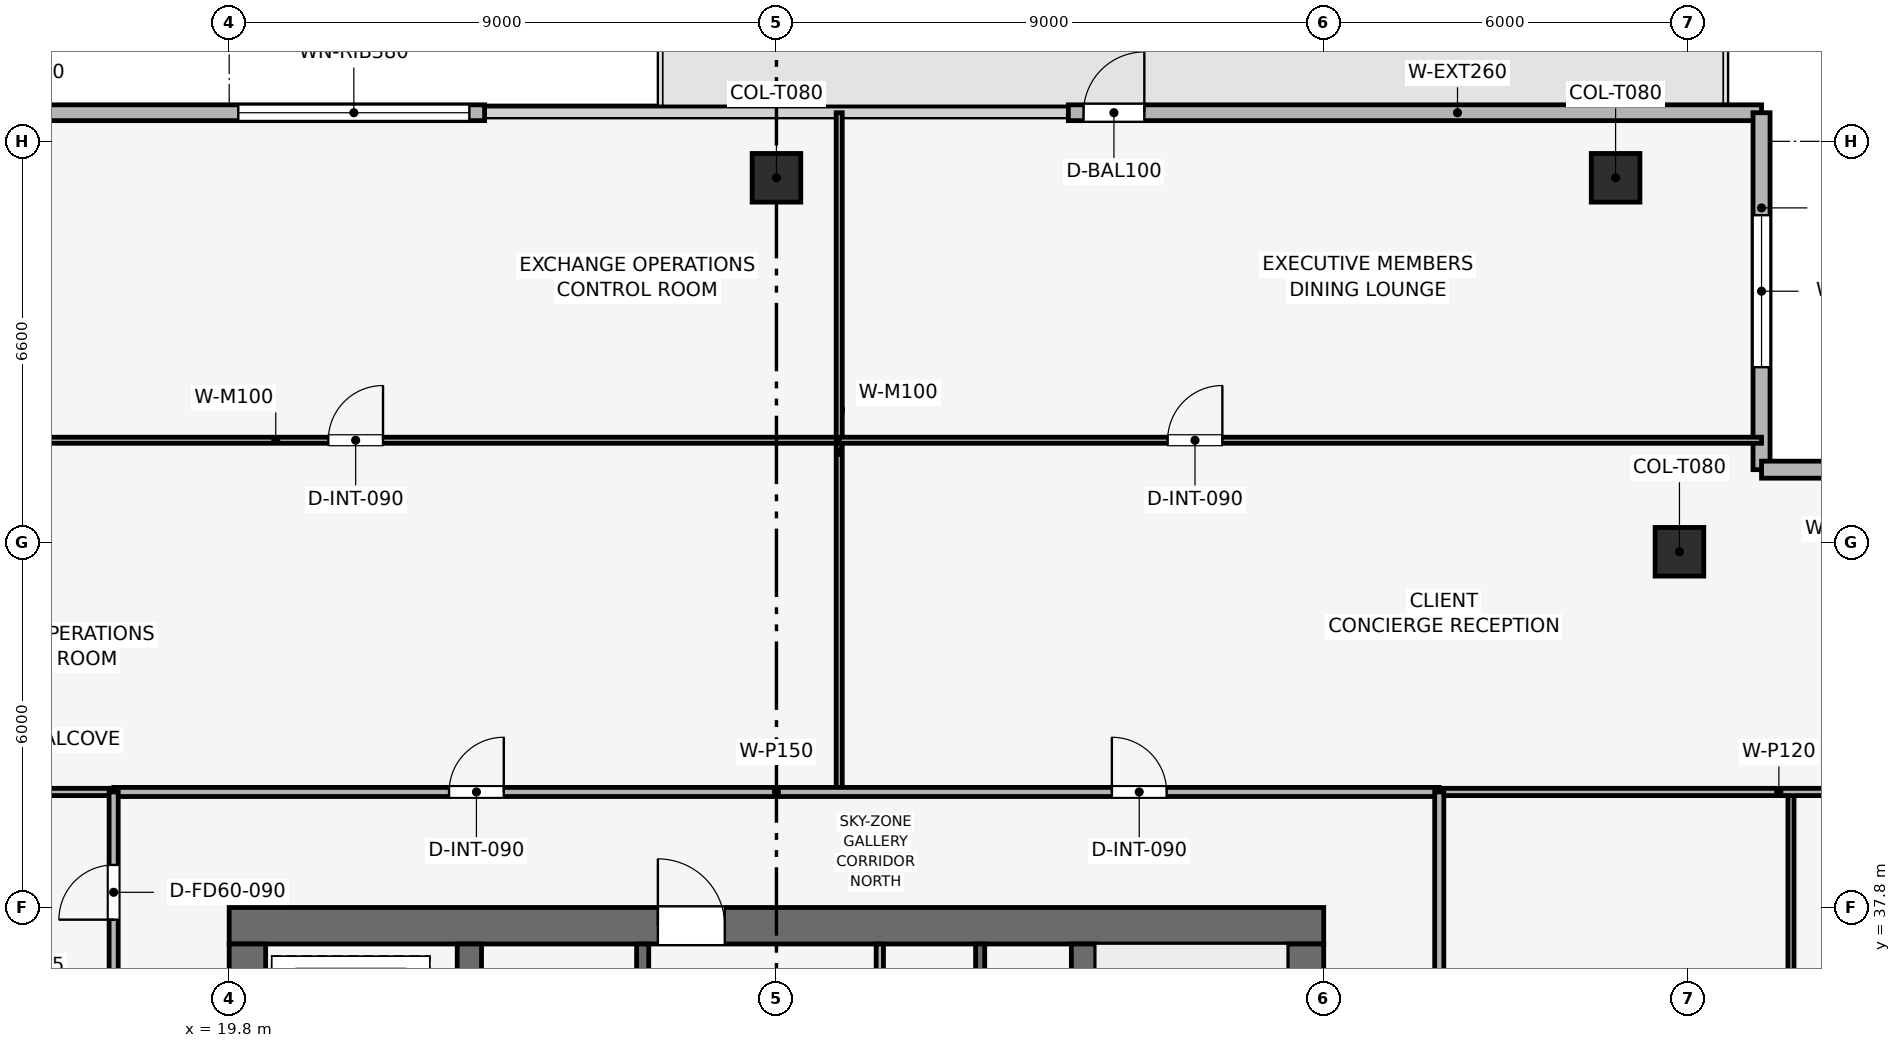
"""IFC4 building model, lengths in metres.
Left out: names, types, materials, properties, quantities, classifications, styles, units other than length and angle.
Written with IfcOpenShell. Run it as: python <this file> out.ifc"""

import sys

from ifc_helpers import new_model, si_unit, direction, frame, frame_2d, origin, origin_2d, place, context, subcontext, project, spatial, rectangle, extrude, element, fill, save


model = new_model("IFC4")
c1 = context("Model", 3, precision=1e-05, world=origin(), true_north=direction((0.0, 1.0)))
c2 = subcontext(c1, "Body", "Model", "MODEL_VIEW")
j1 = project(units=[si_unit("LENGTHUNIT", "METRE"), si_unit("PLANEANGLEUNIT", "RADIAN")], contexts=[c1])
p1 = place(None, origin())
s1 = spatial("IfcSite", under=j1, at=p1, CompositionType="ELEMENT")
p2 = place(p1, origin())
s2 = spatial("IfcBuilding", under=s1, at=p2, CompositionType="ELEMENT")
p3 = place(p2, frame((0.0, 0.0, 336.75)))
s3 = spatial("IfcBuildingStorey", under=s2, at=p3, CompositionType="ELEMENT", Elevation=336.75)
p4 = place(p3, frame((19.8, 37.5, 0.0), z_axis=(0.0, 0.0, 1.0), x_axis=(1.0, 0.0, 0.0)))
e1 = element("IfcWall", 1, at=p4, inside=s3, PredefinedType="SHEAR", context=c2, shape_type="SweptSolid", body=[
    extrude(rectangle(XDim=18.0, YDim=0.6, at=frame_2d((9.0, 0.0))), origin(), (0.0, 0.0, 1.0), 3.75),
])
p5 = place(p4, frame((7.05, 0.0, 0.0)))
e2 = element("IfcOpeningElement", 2, at=p5, cuts=e1, PredefinedType="OPENING", context=c2, shape_type="SweptSolid", body=[
    extrude(rectangle(XDim=1.1, YDim=2.15, at=frame_2d((0.55, 1.075))), frame((0.0, 0.31, 0.0), z_axis=(0.0, -1.0, 0.0), x_axis=(1.0, 0.0, 0.0)), (0.0, 0.0, 1.0), 0.62),
])
p6 = place(p3, frame((20.1, 20.4, 0.0), z_axis=(0.0, 0.0, 1.0), x_axis=(0.0, 1.0, 0.0)))
e3 = element("IfcWall", 3, at=p6, inside=s3, PredefinedType="SHEAR", context=c2, shape_type="SweptSolid", body=[
    extrude(rectangle(XDim=16.8, YDim=0.6, at=frame_2d((8.4, 0.0))), origin(), (0.0, 0.0, 1.0), 3.75),
])
p7 = place(p6, frame((10.4, 0.0, 0.0)))
e4 = element("IfcOpeningElement", 4, at=p7, cuts=e3, PredefinedType="OPENING", context=c2, shape_type="SweptSolid", body=[
    extrude(rectangle(XDim=1.1, YDim=2.15, at=frame_2d((0.55, 1.075))), frame((0.0, 0.31, 0.0), z_axis=(0.0, -1.0, 0.0), x_axis=(1.0, 0.0, 0.0)), (0.0, 0.0, 1.0), 0.62),
])
p8 = place(p3, frame((37.5, 20.4, 0.0), z_axis=(0.0, 0.0, 1.0), x_axis=(0.0, 1.0, 0.0)))
e5 = element("IfcWall", 5, at=p8, inside=s3, PredefinedType="SHEAR", context=c2, shape_type="SweptSolid", body=[
    extrude(rectangle(XDim=16.8, YDim=0.6, at=frame_2d((8.4, 0.0))), origin(), (0.0, 0.0, 1.0), 3.75),
])
p9 = place(p8, frame((4.9, 0.0, 0.0)))
e6 = element("IfcOpeningElement", 6, at=p9, cuts=e5, PredefinedType="OPENING", context=c2, shape_type="SweptSolid", body=[
    extrude(rectangle(XDim=1.1, YDim=2.15, at=frame_2d((0.55, 1.075))), frame((0.0, 0.31, 0.0), z_axis=(0.0, -1.0, 0.0), x_axis=(1.0, 0.0, 0.0)), (0.0, 0.0, 1.0), 0.62),
])
for number, where, z_axis, x_axis in (
    (7, (23.75, 20.4, 0.0), (0.0, 0.0, 1.0), (0.0, 1.0, 0.0)),
    (8, (33.85, 20.4, 0.0), (0.0, 0.0, 1.0), (0.0, 1.0, 0.0)),
):
    element("IfcWall", number, at=place(p3, frame(where, z_axis=z_axis, x_axis=x_axis)), inside=s3, PredefinedType="SHEAR", context=c2, shape_type="SweptSolid", body=[
        extrude(rectangle(XDim=16.8, YDim=0.4, at=frame_2d((8.4, 0.0))), origin(), (0.0, 0.0, 1.0), 3.75),
    ])
for number, where, z_axis, x_axis in (
    (9, (42.6, 49.8, 0.003), (0.0, 0.0, 1.0), (1.0, 0.0, 0.0)),
    (10, (28.8, 49.8, 0.003), (0.0, 0.0, 1.0), (1.0, 0.0, 0.0)),
    (11, (43.65, 43.65, 0.003), (0.0, 0.0, 1.0), (1.0, 0.0, 0.0)),
):
    element("IfcColumn", number, at=place(p3, frame(where, z_axis=z_axis, x_axis=x_axis)), inside=s3, PredefinedType="COLUMN", context=c2, shape_type="SweptSolid", body=[
        extrude(rectangle(XDim=0.8, YDim=0.8, at=origin_2d()), origin(), (0.0, 0.0, 1.0), 3.504),
    ])
p10 = place(p3, frame((12.6, 50.87, 0.0), z_axis=(0.0, 0.0, 1.0), x_axis=(1.0, 0.0, 0.0)))
e12 = element("IfcWall", 12, at=p10, inside=s3, PredefinedType="SOLIDWALL", context=c2, shape_type="SweptSolid", body=[
    extrude(rectangle(XDim=11.4, YDim=0.26, at=frame_2d((5.7, 0.0))), origin(), (0.0, 0.0, 1.0), 3.51),
])
p11 = place(p10, frame((7.35, 0.0, 0.9)))
e13 = element("IfcOpeningElement", 13, at=p11, cuts=e12, PredefinedType="OPENING", context=c2, shape_type="SweptSolid", body=[
    extrude(rectangle(XDim=3.8, YDim=1.9, at=frame_2d((1.9, 0.95))), frame((0.0, 0.14, 0.0), z_axis=(0.0, -1.0, 0.0), x_axis=(1.0, 0.0, 0.0)), (0.0, 0.0, 1.0), 0.28),
])
p12 = place(p3, frame((33.6, 50.87, 0.0), z_axis=(0.0, 0.0, 1.0), x_axis=(1.0, 0.0, 0.0)))
e14 = element("IfcWall", 14, at=p12, inside=s3, PredefinedType="SOLIDWALL", context=c2, shape_type="SweptSolid", body=[
    extrude(rectangle(XDim=11.4, YDim=0.26, at=frame_2d((5.7, 0.0))), origin(), (0.0, 0.0, 1.0), 3.51),
])
p13 = place(p12, frame((0.25, 0.0, 0.0)))
e15 = element("IfcOpeningElement", 15, at=p13, cuts=e14, PredefinedType="OPENING", context=c2, shape_type="SweptSolid", body=[
    extrude(rectangle(XDim=1.0, YDim=2.2, at=frame_2d((0.5, 1.1))), frame((0.0, 0.14, 0.0), z_axis=(0.0, -1.0, 0.0), x_axis=(1.0, 0.0, 0.0)), (0.0, 0.0, 1.0), 0.28),
])
p14 = place(p3, frame((45.0, 50.87, 0.0), z_axis=(0.0, 0.0, 1.0), x_axis=(0.0, -1.0, 0.0)))
e16 = element("IfcWall", 16, at=p14, inside=s3, PredefinedType="SOLIDWALL", context=c2, shape_type="SweptSolid", body=[
    extrude(rectangle(XDim=5.87, YDim=0.28, at=frame_2d((2.935, 0.0))), origin(), (0.0, 0.0, 1.0), 3.51),
])
p15 = place(p14, frame((1.685, 0.0, 0.9)))
e17 = element("IfcOpeningElement", 17, at=p15, cuts=e16, PredefinedType="OPENING", context=c2, shape_type="SweptSolid", body=[
    extrude(rectangle(XDim=2.5, YDim=1.9, at=frame_2d((1.25, 0.95))), frame((0.0, 0.15, 0.0), z_axis=(0.0, -1.0, 0.0), x_axis=(1.0, 0.0, 0.0)), (0.0, 0.0, 1.0), 0.3),
])
p16 = place(p3, frame((45.0, 45.0, 0.0), z_axis=(0.0, 0.0, 1.0), x_axis=(1.0, 0.0, 0.0)))
e18 = element("IfcWall", 18, at=p16, inside=s3, PredefinedType="SOLIDWALL", context=c2, shape_type="SweptSolid", body=[
    extrude(rectangle(XDim=5.87, YDim=0.28, at=frame_2d((2.935, 0.0))), origin(), (0.0, 0.0, 1.0), 3.51),
])
p17 = place(p16, frame((1.685, 0.0, 0.9)))
e19 = element("IfcOpeningElement", 19, at=p17, cuts=e18, PredefinedType="OPENING", context=c2, shape_type="SweptSolid", body=[
    extrude(rectangle(XDim=2.5, YDim=1.9, at=frame_2d((1.25, 0.95))), frame((0.0, 0.15, 0.0), z_axis=(0.0, -1.0, 0.0), x_axis=(1.0, 0.0, 0.0)), (0.0, 0.0, 1.0), 0.3),
])
p18 = place(p3, frame((32.15, 34.0, 0.0), z_axis=(0.0, 0.0, 1.0), x_axis=(0.0, 1.0, 0.0)))
e20 = element("IfcWall", 20, at=p18, inside=s3, PredefinedType="SHEAR", context=c2, shape_type="SweptSolid", body=[
    extrude(rectangle(XDim=3.2, YDim=0.15, at=frame_2d((1.6, 0.0))), origin(), (0.0, 0.0, 1.0), 3.51),
])
p19 = place(p3, frame((26.6, 34.0, 0.0), z_axis=(0.0, 0.0, 1.0), x_axis=(0.0, 1.0, 0.0)))
e21 = element("IfcWall", 21, at=p19, inside=s3, PredefinedType="SHEAR", context=c2, shape_type="SweptSolid", body=[
    extrude(rectangle(XDim=3.2, YDim=0.2, at=frame_2d((1.6, 0.0))), origin(), (0.0, 0.0, 1.0), 3.51),
])
p20 = place(p19, frame((0.75, 0.0, 0.0)))
e22 = element("IfcOpeningElement", 22, at=p20, cuts=e21, PredefinedType="OPENING", context=c2, shape_type="SweptSolid", body=[
    extrude(rectangle(XDim=1.1, YDim=2.15, at=frame_2d((0.55, 1.075))), frame((0.0, 0.11, 0.0), z_axis=(0.0, -1.0, 0.0), x_axis=(1.0, 0.0, 0.0)), (0.0, 0.0, 1.0), 0.22),
])
p21 = place(p3, frame((30.5, 33.925, 0.0), z_axis=(0.0, 0.0, 1.0), x_axis=(0.0, 1.0, 0.0)))
e23 = element("IfcWall", 23, at=p21, inside=s3, PredefinedType="PARTITIONING", context=c2, shape_type="SweptSolid", body=[
    extrude(rectangle(XDim=3.275, YDim=0.12, at=frame_2d((1.637, 0.0))), origin(), (0.0, 0.0, 1.0), 3.51),
])
p22 = place(p21, frame((0.85, 0.0, 0.0)))
e24 = element("IfcOpeningElement", 24, at=p22, cuts=e23, PredefinedType="OPENING", context=c2, shape_type="SweptSolid", body=[
    extrude(rectangle(XDim=0.9, YDim=2.1, at=frame_2d((0.45, 1.05))), frame((0.0, 0.07, 0.0), z_axis=(0.0, -1.0, 0.0), x_axis=(1.0, 0.0, 0.0)), (0.0, 0.0, 1.0), 0.14),
])
p23 = place(p3, frame((12.6, 45.484, 0.0), z_axis=(0.0, 0.0, 1.0), x_axis=(1.0, 0.0, 0.0)))
e25 = element("IfcWall", 25, at=p23, inside=s3, PredefinedType="MOVABLE", context=c2, shape_type="SweptSolid", body=[
    extrude(rectangle(XDim=17.232, YDim=0.1, at=frame_2d((8.616, 0.0))), origin(), (0.0, 0.0, 1.0), 3.095),
])
p24 = place(p23, frame((8.83, 0.0, 0.0)))
e26 = element("IfcOpeningElement", 26, at=p24, cuts=e25, PredefinedType="OPENING", context=c2, shape_type="SweptSolid", body=[
    extrude(rectangle(XDim=0.9, YDim=2.1, at=frame_2d((0.45, 1.05))), frame((0.0, 0.06, 0.0), z_axis=(0.0, -1.0, 0.0), x_axis=(1.0, 0.0, 0.0)), (0.0, 0.0, 1.0), 0.12),
])
p25 = place(p3, frame((29.832, 39.7, 0.0), z_axis=(0.0, 0.0, 1.0), x_axis=(0.0, 1.0, 0.0)))
e27 = element("IfcWall", 27, at=p25, inside=s3, PredefinedType="MOVABLE", context=c2, shape_type="SweptSolid", body=[
    extrude(rectangle(XDim=11.17, YDim=0.1, at=frame_2d((5.585, 0.0))), origin(), (0.0, 0.0, 1.0), 3.135),
])
p26 = place(p3, frame((29.832, 45.484, 0.0), z_axis=(0.0, 0.0, 1.0), x_axis=(1.0, 0.0, 0.0)))
e28 = element("IfcWall", 28, at=p26, inside=s3, PredefinedType="MOVABLE", context=c2, shape_type="SweptSolid", body=[
    extrude(rectangle(XDim=15.168, YDim=0.1, at=frame_2d((7.584, 0.0))), origin(), (0.0, 0.0, 1.0), 3.095),
])
p27 = place(p26, frame((5.401, 0.0, 0.0)))
e29 = element("IfcOpeningElement", 29, at=p27, cuts=e28, PredefinedType="OPENING", context=c2, shape_type="SweptSolid", body=[
    extrude(rectangle(XDim=0.9, YDim=2.1, at=frame_2d((0.45, 1.05))), frame((0.0, 0.06, 0.0), z_axis=(0.0, -1.0, 0.0), x_axis=(1.0, 0.0, 0.0)), (0.0, 0.0, 1.0), 0.12),
])
p28 = place(p3, frame((45.484, 30.931, 0.0), z_axis=(0.0, 0.0, 1.0), x_axis=(0.0, 1.0, 0.0)))
e30 = element("IfcWall", 30, at=p28, inside=s3, PredefinedType="MOVABLE", context=c2, shape_type="SweptSolid", body=[
    extrude(rectangle(XDim=8.769, YDim=0.1, at=frame_2d((4.385, 0.0))), origin(), (0.0, 0.0, 1.0), 3.095),
])
p29 = place(p28, frame((4.246, 0.0, 0.0)))
e31 = element("IfcOpeningElement", 31, at=p29, cuts=e30, PredefinedType="OPENING", context=c2, shape_type="SweptSolid", body=[
    extrude(rectangle(XDim=0.9, YDim=2.1, at=frame_2d((0.45, 1.05))), frame((0.0, 0.06, 0.0), z_axis=(0.0, -1.0, 0.0), x_axis=(1.0, 0.0, 0.0)), (0.0, 0.0, 1.0), 0.12),
])
p30 = place(p3, frame((6.73, 39.7, 0.0), z_axis=(0.0, 0.0, 1.0), x_axis=(1.0, 0.0, 0.0)))
e32 = element("IfcWall", 32, at=p30, inside=s3, PredefinedType="PARTITIONING", context=c2, shape_type="SweptSolid", body=[
    extrude(rectangle(XDim=11.17, YDim=0.12, at=frame_2d((5.585, 0.0))), origin(), (0.0, 0.0, 1.0), 3.095),
])
p31 = place(p3, frame((39.7, 39.7, 0.0), z_axis=(0.0, 0.0, 1.0), x_axis=(1.0, 0.0, 0.0)))
e33 = element("IfcWall", 33, at=p31, inside=s3, PredefinedType="PARTITIONING", context=c2, shape_type="SweptSolid", body=[
    extrude(rectangle(XDim=11.17, YDim=0.12, at=frame_2d((5.585, 0.0))), origin(), (0.0, 0.0, 1.0), 3.095),
])
p32 = place(p3, frame((17.9, 39.7, 0.0), z_axis=(0.0, 0.0, 1.0), x_axis=(1.0, 0.0, 0.0)))
e34 = element("IfcWall", 34, at=p32, inside=s3, PredefinedType="PARTITIONING", context=c2, shape_type="SweptSolid", body=[
    extrude(rectangle(XDim=21.8, YDim=0.15, at=frame_2d((10.9, 0.0))), origin(), (0.0, 0.0, 1.0), 3.095),
])
p33 = place(p32, frame((5.516, 0.0, 0.0)))
e35 = element("IfcOpeningElement", 35, at=p33, cuts=e34, PredefinedType="OPENING", context=c2, shape_type="SweptSolid", body=[
    extrude(rectangle(XDim=0.9, YDim=2.1, at=frame_2d((0.45, 1.05))), frame((0.0, 0.085, 0.0), z_axis=(0.0, -1.0, 0.0), x_axis=(1.0, 0.0, 0.0)), (0.0, 0.0, 1.0), 0.17),
])
p34 = place(p32, frame((16.416, 0.0, 0.0)))
e36 = element("IfcOpeningElement", 36, at=p34, cuts=e34, PredefinedType="OPENING", context=c2, shape_type="SweptSolid", body=[
    extrude(rectangle(XDim=0.9, YDim=2.1, at=frame_2d((0.45, 1.05))), frame((0.0, 0.085, 0.0), z_axis=(0.0, -1.0, 0.0), x_axis=(1.0, 0.0, 0.0)), (0.0, 0.0, 1.0), 0.17),
])
p35 = place(p3, frame((17.9, 12.6, 0.0), z_axis=(0.0, 0.0, 1.0), x_axis=(0.0, 1.0, 0.0)))
e37 = element("IfcWall", 37, at=p35, inside=s3, PredefinedType="PARTITIONING", context=c2, shape_type="SweptSolid", body=[
    extrude(rectangle(XDim=27.1, YDim=0.15, at=frame_2d((13.55, 0.0))), origin(), (0.0, 0.0, 1.0), 3.095),
])
p36 = place(p35, frame((7.25, 0.0, 0.0)))
e38 = element("IfcOpeningElement", 38, at=p36, cuts=e37, PredefinedType="OPENING", context=c2, shape_type="SweptSolid", body=[
    extrude(rectangle(XDim=0.9, YDim=2.1, at=frame_2d((0.45, 1.05))), frame((0.0, 0.085, 0.0), z_axis=(0.0, -1.0, 0.0), x_axis=(1.0, 0.0, 0.0)), (0.0, 0.0, 1.0), 0.17),
])
p37 = place(p35, frame((16.35, 0.0, 0.0)))
e39 = element("IfcOpeningElement", 39, at=p37, cuts=e37, PredefinedType="OPENING", context=c2, shape_type="SweptSolid", body=[
    extrude(rectangle(XDim=0.9, YDim=2.1, at=frame_2d((0.45, 1.05))), frame((0.0, 0.085, 0.0), z_axis=(0.0, -1.0, 0.0), x_axis=(1.0, 0.0, 0.0)), (0.0, 0.0, 1.0), 0.17),
])
p38 = place(p35, frame((19.25, 0.0, 0.0)))
e40 = element("IfcOpeningElement", 40, at=p38, cuts=e37, PredefinedType="OPENING", context=c2, shape_type="SweptSolid", body=[
    extrude(rectangle(XDim=0.9, YDim=2.1, at=frame_2d((0.45, 1.05))), frame((0.0, 0.085, 0.0), z_axis=(0.0, -1.0, 0.0), x_axis=(1.0, 0.0, 0.0)), (0.0, 0.0, 1.0), 0.17),
])
p39 = place(p35, frame((22.0, 0.0, 0.0)))
e41 = element("IfcOpeningElement", 41, at=p39, cuts=e37, PredefinedType="OPENING", context=c2, shape_type="SweptSolid", body=[
    extrude(rectangle(XDim=0.95, YDim=2.1, at=frame_2d((0.475, 1.05))), frame((0.0, 0.085, 0.0), z_axis=(0.0, -1.0, 0.0), x_axis=(1.0, 0.0, 0.0)), (0.0, 0.0, 1.0), 0.17),
])
p40 = place(p35, frame((25.0, 0.0, 0.0)))
e42 = element("IfcOpeningElement", 42, at=p40, cuts=e37, PredefinedType="OPENING", context=c2, shape_type="SweptSolid", body=[
    extrude(rectangle(XDim=0.9, YDim=2.1, at=frame_2d((0.45, 1.05))), frame((0.0, 0.085, 0.0), z_axis=(0.0, -1.0, 0.0), x_axis=(1.0, 0.0, 0.0)), (0.0, 0.0, 1.0), 0.17),
])
p41 = place(p3, frame((39.7, 24.4, 0.0), z_axis=(0.0, 0.0, 1.0), x_axis=(0.0, 1.0, 0.0)))
e43 = element("IfcWall", 43, at=p41, inside=s3, PredefinedType="PARTITIONING", context=c2, shape_type="SweptSolid", body=[
    extrude(rectangle(XDim=15.3, YDim=0.15, at=frame_2d((7.65, 0.0))), origin(), (0.0, 0.0, 1.0), 3.095),
])
p42 = place(p41, frame((0.7, 0.0, 0.0)))
e44 = element("IfcOpeningElement", 44, at=p42, cuts=e43, PredefinedType="OPENING", context=c2, shape_type="SweptSolid", body=[
    extrude(rectangle(XDim=0.9, YDim=2.1, at=frame_2d((0.45, 1.05))), frame((0.0, 0.085, 0.0), z_axis=(0.0, -1.0, 0.0), x_axis=(1.0, 0.0, 0.0)), (0.0, 0.0, 1.0), 0.17),
])
p43 = place(p41, frame((3.966, 0.0, 0.0)))
e45 = element("IfcOpeningElement", 45, at=p43, cuts=e43, PredefinedType="OPENING", context=c2, shape_type="SweptSolid", body=[
    extrude(rectangle(XDim=0.9, YDim=2.1, at=frame_2d((0.45, 1.05))), frame((0.0, 0.085, 0.0), z_axis=(0.0, -1.0, 0.0), x_axis=(1.0, 0.0, 0.0)), (0.0, 0.0, 1.0), 0.17),
])
p44 = place(p41, frame((10.465, 0.0, 0.0)))
e46 = element("IfcOpeningElement", 46, at=p44, cuts=e43, PredefinedType="OPENING", context=c2, shape_type="SweptSolid", body=[
    extrude(rectangle(XDim=0.9, YDim=2.1, at=frame_2d((0.45, 1.05))), frame((0.0, 0.085, 0.0), z_axis=(0.0, -1.0, 0.0), x_axis=(1.0, 0.0, 0.0)), (0.0, 0.0, 1.0), 0.17),
])
p45 = place(p13, origin())
e47 = element("IfcDoor", 47, at=p45, inside=s3, OperationType="SINGLE_SWING_RIGHT", PredefinedType="DOOR", context=c2, shape_type="SweptSolid", body=[
    extrude(rectangle(XDim=1.0, YDim=2.2, at=frame_2d((0.5, 1.1))), frame((0.0, 0.025, 0.0), z_axis=(0.0, -1.0, 0.0), x_axis=(1.0, 0.0, 0.0)), (0.0, 0.0, 1.0), 0.05),
])
fill(e15, e47)
p46 = place(p11, origin())
e48 = element("IfcWindow", 48, at=p46, inside=s3, PartitioningType="SINGLE_PANEL", PredefinedType="WINDOW", context=c2, shape_type="SweptSolid", body=[
    extrude(rectangle(XDim=3.8, YDim=1.9, at=frame_2d((1.9, 0.95))), frame((0.0, 0.03, 0.0), z_axis=(0.0, -1.0, 0.0), x_axis=(1.0, 0.0, 0.0)), (0.0, 0.0, 1.0), 0.06),
])
fill(e13, e48)
p47 = place(p15, origin())
e49 = element("IfcWindow", 49, at=p47, inside=s3, PartitioningType="SINGLE_PANEL", PredefinedType="WINDOW", context=c2, shape_type="SweptSolid", body=[
    extrude(rectangle(XDim=2.5, YDim=1.9, at=frame_2d((1.25, 0.95))), frame((0.0, 0.03, 0.0), z_axis=(0.0, -1.0, 0.0), x_axis=(1.0, 0.0, 0.0)), (0.0, 0.0, 1.0), 0.06),
])
fill(e17, e49)
p48 = place(p24, origin())
e50 = element("IfcDoor", 50, at=p48, inside=s3, OperationType="SINGLE_SWING_RIGHT", PredefinedType="DOOR", context=c2, shape_type="SweptSolid", body=[
    extrude(rectangle(XDim=0.9, YDim=2.1, at=frame_2d((0.45, 1.05))), frame((0.0, 0.025, 0.0), z_axis=(0.0, -1.0, 0.0), x_axis=(1.0, 0.0, 0.0)), (0.0, 0.0, 1.0), 0.05),
])
fill(e26, e50)
p49 = place(p27, origin())
e51 = element("IfcDoor", 51, at=p49, inside=s3, OperationType="SINGLE_SWING_RIGHT", PredefinedType="DOOR", context=c2, shape_type="SweptSolid", body=[
    extrude(rectangle(XDim=0.9, YDim=2.1, at=frame_2d((0.45, 1.05))), frame((0.0, 0.025, 0.0), z_axis=(0.0, -1.0, 0.0), x_axis=(1.0, 0.0, 0.0)), (0.0, 0.0, 1.0), 0.05),
])
fill(e29, e51)
p50 = place(p33, origin())
e52 = element("IfcDoor", 52, at=p50, inside=s3, OperationType="SINGLE_SWING_RIGHT", PredefinedType="DOOR", context=c2, shape_type="SweptSolid", body=[
    extrude(rectangle(XDim=0.9, YDim=2.1, at=frame_2d((0.45, 1.05))), frame((0.0, 0.025, 0.0), z_axis=(0.0, -1.0, 0.0), x_axis=(1.0, 0.0, 0.0)), (0.0, 0.0, 1.0), 0.05),
])
fill(e35, e52)
p51 = place(p34, origin())
e53 = element("IfcDoor", 53, at=p51, inside=s3, OperationType="SINGLE_SWING_LEFT", PredefinedType="DOOR", context=c2, shape_type="SweptSolid", body=[
    extrude(rectangle(XDim=0.9, YDim=2.1, at=frame_2d((0.45, 1.05))), frame((0.0, 0.025, 0.0), z_axis=(0.0, -1.0, 0.0), x_axis=(1.0, 0.0, 0.0)), (0.0, 0.0, 1.0), 0.05),
])
fill(e36, e53)
p52 = place(p40, origin())
e54 = element("IfcDoor", 54, at=p52, inside=s3, OperationType="SINGLE_SWING_LEFT", PredefinedType="DOOR", context=c2, shape_type="SweptSolid", body=[
    extrude(rectangle(XDim=0.9, YDim=2.1, at=frame_2d((0.45, 1.05))), frame((0.0, 0.025, 0.0), z_axis=(0.0, -1.0, 0.0), x_axis=(1.0, 0.0, 0.0)), (0.0, 0.0, 1.0), 0.05),
])
fill(e42, e54)
p53 = place(p5, origin())
e55 = element("IfcDoor", 55, at=p53, inside=s3, OperationType="SINGLE_SWING_LEFT", PredefinedType="DOOR", context=c2, shape_type="SweptSolid", body=[
    extrude(rectangle(XDim=1.1, YDim=2.15, at=frame_2d((0.55, 1.075))), frame((0.0, 0.025, 0.0), z_axis=(0.0, -1.0, 0.0), x_axis=(1.0, 0.0, 0.0)), (0.0, 0.0, 1.0), 0.05),
])
fill(e2, e55)
save(model, sys.argv[1])
